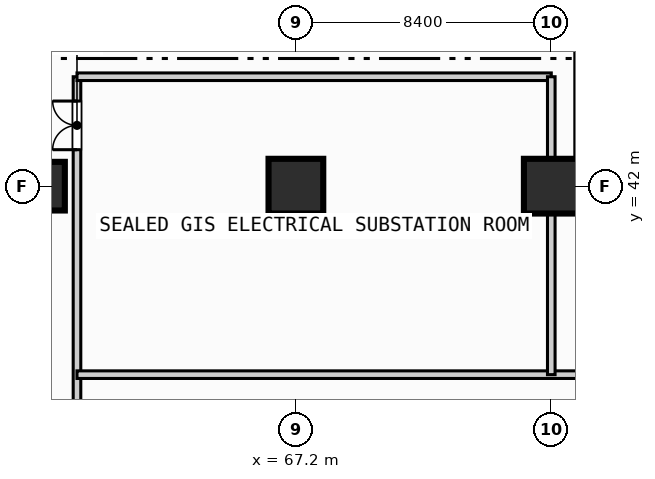
"""IFC4 building model, lengths in metres.
Left out: names, types, materials, properties, quantities, classifications, styles, units other than length and angle.
Written with IfcOpenShell. Run it as: python <this file> out.ifc"""

import sys

from ifc_helpers import new_model, si_unit, direction, frame, frame_2d, origin, origin_2d, place, context, subcontext, project, spatial, rectangle, extrude, element, fill, save


model = new_model("IFC4")
c1 = context("Model", 3, precision=1e-05, world=origin(), true_north=direction((0.0, 1.0)))
c2 = subcontext(c1, "Body", "Model", "MODEL_VIEW")
j1 = project(units=[si_unit("LENGTHUNIT", "METRE"), si_unit("PLANEANGLEUNIT", "RADIAN")], contexts=[c1])
p1 = place(None, origin())
s1 = spatial("IfcSite", under=j1, at=p1, CompositionType="ELEMENT")
p2 = place(p1, origin())
s2 = spatial("IfcBuilding", under=s1, at=p2, CompositionType="ELEMENT")
p3 = place(p2, frame((0.0, 0.0, -8.4)))
s3 = spatial("IfcBuildingStorey", under=s2, at=p3, CompositionType="ELEMENT", Elevation=-8.4)
p4 = place(p3, frame((58.8, 42.0, 0.0), z_axis=(0.0, 0.0, 1.0), x_axis=(1.0, 0.0, 0.0)))
e1 = element("IfcColumn", 1, at=p4, inside=s3, PredefinedType="COLUMN", context=c2, shape_type="SweptSolid", body=[
    extrude(rectangle(XDim=1.6, YDim=1.6, at=origin_2d()), origin(), (0.0, 0.0, 1.0), 4.2),
])
for number, where, z_axis, x_axis in (
    (2, (67.2, 42.0, 0.0), (0.0, 0.0, 1.0), (1.0, 0.0, 0.0)),
    (3, (75.6, 42.0, 0.0), (0.0, 0.0, 1.0), (1.0, 0.0, 0.0)),
):
    element("IfcColumn", number, at=place(p3, frame(where, z_axis=z_axis, x_axis=x_axis)), inside=s3, PredefinedType="COLUMN", context=c2, shape_type="SweptSolid", body=[
        extrude(rectangle(XDim=1.8, YDim=1.8, at=origin_2d()), origin(), (0.0, 0.0, 1.0), 4.2),
    ])
p5 = place(p3, frame((60.0, 26.0, 0.0), z_axis=(0.0, 0.0, 1.0), x_axis=(0.0, 1.0, 0.0)))
e4 = element("IfcWall", 4, at=p5, inside=s3, PredefinedType="SOLIDWALL", context=c2, shape_type="SweptSolid", body=[
    extrude(rectangle(XDim=19.6, YDim=0.25, at=frame_2d((9.8, 0.0))), origin(), (0.0, 0.0, 1.0), 3.85),
])
p6 = place(p5, frame((2.4, 0.0, 0.0)))
e5 = element("IfcOpeningElement", 5, at=p6, cuts=e4, PredefinedType="OPENING", context=c2, shape_type="SweptSolid", body=[
    extrude(rectangle(XDim=1.6, YDim=2.2, at=frame_2d((0.8, 1.1))), frame((0.0, 0.135, 0.0), z_axis=(0.0, -1.0, 0.0), x_axis=(1.0, 0.0, 0.0)), (0.0, 0.0, 1.0), 0.27),
])
p7 = place(p5, frame((17.2, 0.0, 0.0)))
e6 = element("IfcOpeningElement", 6, at=p7, cuts=e4, PredefinedType="OPENING", context=c2, shape_type="SweptSolid", body=[
    extrude(rectangle(XDim=1.6, YDim=2.2, at=frame_2d((0.8, 1.1))), frame((0.0, 0.135, 0.0), z_axis=(0.0, -1.0, 0.0), x_axis=(1.0, 0.0, 0.0)), (0.0, 0.0, 1.0), 0.27),
])
p8 = place(p3, frame((60.0, 35.8, 0.0), z_axis=(0.0, 0.0, 1.0), x_axis=(1.0, 0.0, 0.0)))
e7 = element("IfcWall", 7, at=p8, inside=s3, PredefinedType="SOLIDWALL", context=c2, shape_type="SweptSolid", body=[
    extrude(rectangle(XDim=31.6, YDim=0.25, at=frame_2d((15.8, 0.0))), origin(), (0.0, 0.0, 1.0), 3.85),
])
p9 = place(p3, frame((60.0, 45.6, 0.0), z_axis=(0.0, 0.0, 1.0), x_axis=(1.0, 0.0, 0.0)))
e8 = element("IfcWall", 8, at=p9, inside=s3, PredefinedType="SOLIDWALL", context=c2, shape_type="SweptSolid", body=[
    extrude(rectangle(XDim=15.6, YDim=0.25, at=frame_2d((7.8, 0.0))), origin(), (0.0, 0.0, 1.0), 3.85),
])
p10 = place(p3, frame((75.6, 35.8, 0.0), z_axis=(0.0, 0.0, 1.0), x_axis=(0.0, 1.0, 0.0)))
e9 = element("IfcWall", 9, at=p10, inside=s3, PredefinedType="SOLIDWALL", context=c2, shape_type="SweptSolid", body=[
    extrude(rectangle(XDim=9.8, YDim=0.25, at=frame_2d((4.9, 0.0))), origin(), (0.0, 0.0, 1.0), 3.0),
])
p11 = place(p7, origin())
e10 = element("IfcDoor", 10, at=p11, inside=s3, OperationType="SINGLE_SWING_LEFT", PredefinedType="DOOR", context=c2, shape_type="SweptSolid", body=[
    extrude(rectangle(XDim=1.6, YDim=2.2, at=frame_2d((0.8, 1.1))), frame((0.0, 0.025, 0.0), z_axis=(0.0, -1.0, 0.0), x_axis=(1.0, 0.0, 0.0)), (0.0, 0.0, 1.0), 0.05),
])
fill(e6, e10)
save(model, sys.argv[1])
